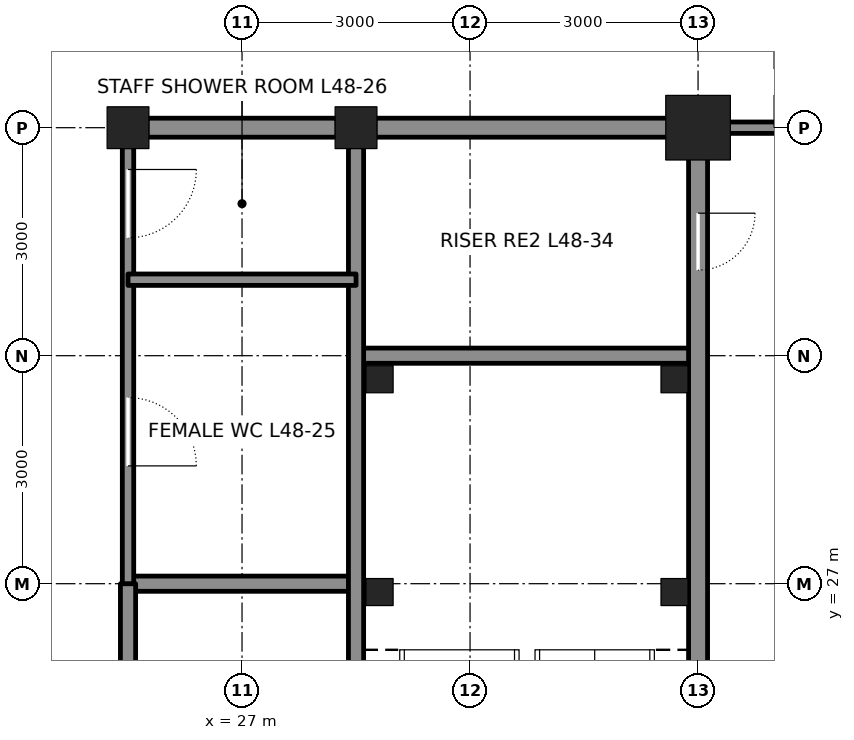
"""IFC4 building model, lengths in metres.
Left out: names, types, materials, properties, quantities, classifications, styles, units other than length and angle.
Written with IfcOpenShell. Run it as: python <this file> out.ifc"""

import sys

from ifc_helpers import new_model, si_unit, direction, frame, frame_2d, origin, origin_2d, place, context, subcontext, project, spatial, rectangle, hollow_rectangle, extrude, element, fill, save


model = new_model("IFC4")
c1 = context("Model", 3, precision=1e-05, world=origin(), true_north=direction((0.0, 1.0)))
c2 = subcontext(c1, "Body", "Model", "MODEL_VIEW")
j1 = project(units=[si_unit("LENGTHUNIT", "METRE"), si_unit("PLANEANGLEUNIT", "RADIAN")], contexts=[c1])
p1 = place(None, origin())
s1 = spatial("IfcSite", under=j1, at=p1, CompositionType="ELEMENT")
p2 = place(p1, origin())
s2 = spatial("IfcBuilding", under=s1, at=p2, CompositionType="ELEMENT")
p3 = place(p2, frame((0.0, 0.0, 218.1)))
s3 = spatial("IfcBuildingStorey", under=s2, at=p3, CompositionType="ELEMENT", Elevation=218.1)
for number, where, z_axis, x_axis in (
    (1, (25.5, 33.0, 0.0), (0.0, 0.0, 1.0), (1.0, 0.0, 0.0)),
    (2, (28.5, 33.0, 0.0), (0.0, 0.0, 1.0), (1.0, 0.0, 0.0)),
):
    element("IfcColumn", number, at=place(p3, frame(where, z_axis=z_axis, x_axis=x_axis)), inside=s3, PredefinedType="COLUMN", context=c2, shape_type="SweptSolid", body=[
        extrude(hollow_rectangle(XDim=0.55, YDim=0.55, WallThickness=0.045, at=origin_2d()), origin(), (0.0, 0.0, 1.0), 4.2),
    ])
p4 = place(p3, frame((33.0, 33.0, 0.0), z_axis=(0.0, 0.0, 1.0), x_axis=(1.0, 0.0, 0.0)))
e3 = element("IfcColumn", 3, at=p4, inside=s3, PredefinedType="COLUMN", context=c2, shape_type="SweptSolid", body=[
    extrude(hollow_rectangle(XDim=0.85, YDim=0.85, WallThickness=0.085, at=origin_2d()), origin(), (0.0, 0.0, 1.0), 4.2),
])
p5 = place(p3, frame((25.5, 27.0, 0.0), z_axis=(0.0, 0.0, 1.0), x_axis=(1.0, 0.0, 0.0)))
e4 = element("IfcWall", 4, at=p5, inside=s3, PredefinedType="SOLIDWALL", context=c2, shape_type="SweptSolid", body=[
    extrude(rectangle(XDim=3.0, YDim=0.2, at=frame_2d((1.5, 0.0))), origin(), (0.0, 0.0, 1.0), 4.04),
])
p6 = place(p3, frame((28.5, 30.0, 0.0), z_axis=(0.0, 0.0, 1.0), x_axis=(1.0, 0.0, 0.0)))
e5 = element("IfcWall", 5, at=p6, inside=s3, PredefinedType="SOLIDWALL", context=c2, shape_type="SweptSolid", body=[
    extrude(rectangle(XDim=4.5, YDim=0.2, at=frame_2d((2.25, 0.0))), origin(), (0.0, 0.0, 1.0), 4.04),
])
p7 = place(p3, frame((25.75, 33.0, 0.0), z_axis=(0.0, 0.0, 1.0), x_axis=(1.0, 0.0, 0.0)))
e6 = element("IfcWall", 6, at=p7, inside=s3, PredefinedType="SOLIDWALL", context=c2, shape_type="SweptSolid", body=[
    extrude(rectangle(XDim=2.5, YDim=0.25, at=frame_2d((1.25, 0.0))), origin(), (0.0, 0.0, 1.0), 3.181),
])
p8 = place(p3, frame((28.75, 33.0, 0.0), z_axis=(0.0, 0.0, 1.0), x_axis=(1.0, 0.0, 0.0)))
e7 = element("IfcWall", 7, at=p8, inside=s3, PredefinedType="SOLIDWALL", context=c2, shape_type="SweptSolid", body=[
    extrude(rectangle(XDim=4.0, YDim=0.25, at=frame_2d((2.0, 0.0))), origin(), (0.0, 0.0, 1.0), 3.181),
])
p9 = place(p3, frame((25.5, 15.0, 0.0), z_axis=(0.0, 0.0, 1.0), x_axis=(0.0, 1.0, 0.0)))
e8 = element("IfcWall", 8, at=p9, inside=s3, PredefinedType="SOLIDWALL", context=c2, shape_type="SweptSolid", body=[
    extrude(rectangle(XDim=12.0, YDim=0.2, at=frame_2d((6.0, 0.0))), origin(), (0.0, 0.0, 1.0), 3.064),
])
p10 = place(p3, frame((25.5, 27.0, 0.0), z_axis=(0.0, 0.0, 1.0), x_axis=(0.0, 1.0, 0.0)))
e9 = element("IfcWall", 9, at=p10, inside=s3, PredefinedType="PARTITIONING", context=c2, shape_type="SweptSolid", body=[
    extrude(rectangle(XDim=5.75, YDim=0.15, at=frame_2d((2.875, 0.0))), origin(), (0.0, 0.0, 1.0), 3.064),
])
p11 = place(p10, frame((1.55, 0.0, 0.0)))
e10 = element("IfcOpeningElement", 10, at=p11, cuts=e9, PredefinedType="OPENING", context=c2, shape_type="SweptSolid", body=[
    extrude(rectangle(XDim=0.9, YDim=2.1, at=frame_2d((0.45, 1.05))), frame((0.0, 0.085, 0.0), z_axis=(0.0, -1.0, 0.0), x_axis=(1.0, 0.0, 0.0)), (0.0, 0.0, 1.0), 0.17),
])
p12 = place(p10, frame((4.55, 0.0, 0.0)))
e11 = element("IfcOpeningElement", 11, at=p12, cuts=e9, PredefinedType="OPENING", context=c2, shape_type="SweptSolid", body=[
    extrude(rectangle(XDim=0.9, YDim=2.1, at=frame_2d((0.45, 1.05))), frame((0.0, 0.085, 0.0), z_axis=(0.0, -1.0, 0.0), x_axis=(1.0, 0.0, 0.0)), (0.0, 0.0, 1.0), 0.17),
])
p13 = place(p3, frame((28.5, 24.25, 0.0), z_axis=(0.0, 0.0, 1.0), x_axis=(0.0, 1.0, 0.0)))
e12 = element("IfcWall", 12, at=p13, inside=s3, PredefinedType="SOLIDWALL", context=c2, shape_type="SweptSolid", body=[
    extrude(rectangle(XDim=8.5, YDim=0.2, at=frame_2d((4.25, 0.0))), origin(), (0.0, 0.0, 1.0), 3.113),
])
p14 = place(p3, frame((33.0, 24.25, 0.0), z_axis=(0.0, 0.0, 1.0), x_axis=(0.0, 1.0, 0.0)))
e13 = element("IfcWall", 13, at=p14, inside=s3, PredefinedType="SOLIDWALL", context=c2, shape_type="SweptSolid", body=[
    extrude(rectangle(XDim=8.5, YDim=0.25, at=frame_2d((4.25, 0.0))), origin(), (0.0, 0.0, 1.0), 3.113),
])
p15 = place(p14, frame((6.875, 0.0, 0.0)))
e14 = element("IfcOpeningElement", 14, at=p15, cuts=e13, PredefinedType="OPENING", context=c2, shape_type="SweptSolid", body=[
    extrude(rectangle(XDim=0.75, YDim=2.1, at=frame_2d((0.375, 1.05))), frame((0.0, 0.135, 0.0), z_axis=(0.0, -1.0, 0.0), x_axis=(1.0, 0.0, 0.0)), (0.0, 0.0, 1.0), 0.27),
])
p16 = place(p3, frame((25.5, 31.0, 0.0), z_axis=(0.0, 0.0, 1.0), x_axis=(1.0, 0.0, 0.0)))
e15 = element("IfcWall", 15, at=p16, inside=s3, PredefinedType="PARTITIONING", context=c2, shape_type="SweptSolid", body=[
    extrude(rectangle(XDim=3.0, YDim=0.15, at=frame_2d((1.5, 0.0))), origin(), (0.0, 0.0, 1.0), 4.04),
])
p17 = place(p3, frame((33.0, 33.0, 0.0), z_axis=(0.0, 0.0, 1.0), x_axis=(1.0, 0.0, 0.0)))
e16 = element("IfcWall", 16, at=p17, inside=s3, PredefinedType="PARTITIONING", context=c2, shape_type="SweptSolid", body=[
    extrude(rectangle(XDim=3.0, YDim=0.15, at=frame_2d((1.5, 0.0))), origin(), (0.0, 0.0, 1.0), 3.27),
])
p18 = place(p17, frame((1.0, 0.0, 0.0)))
e17 = element("IfcOpeningElement", 17, at=p18, cuts=e16, PredefinedType="OPENING", context=c2, shape_type="SweptSolid", body=[
    extrude(rectangle(XDim=1.0, YDim=2.4, at=frame_2d((0.5, 1.2))), frame((0.0, 0.085, 0.0), z_axis=(0.0, -1.0, 0.0), x_axis=(1.0, 0.0, 0.0)), (0.0, 0.0, 1.0), 0.17),
])
for number, where, z_axis, x_axis in (
    (18, (28.81, 29.69, 0.0), (0.0, 0.0, 1.0), (1.0, 0.0, 0.0)),
    (19, (32.69, 29.69, 0.0), (0.0, 0.0, 1.0), (1.0, 0.0, 0.0)),
    (20, (28.81, 26.89, 0.0), (0.0, 0.0, 1.0), (1.0, 0.0, 0.0)),
    (21, (32.69, 26.89, 0.0), (0.0, 0.0, 1.0), (1.0, 0.0, 0.0)),
):
    element("IfcColumn", number, at=place(p3, frame(where, z_axis=z_axis, x_axis=x_axis)), inside=s3, PredefinedType="COLUMN", context=c2, shape_type="SweptSolid", body=[
        extrude(hollow_rectangle(XDim=0.356, YDim=0.356, WallThickness=0.009, at=origin_2d()), origin(), (0.0, 0.0, 1.0), 4.2),
    ])
p19 = place(p15, frame((0.75, 0.0, 0.0), z_axis=(0.0, 0.0, 1.0), x_axis=(-1.0, 0.0, 0.0)))
e22 = element("IfcDoor", 22, at=p19, inside=s3, OperationType="SINGLE_SWING_LEFT", PredefinedType="DOOR", context=c2, shape_type="SweptSolid", body=[
    extrude(rectangle(XDim=0.75, YDim=2.1, at=frame_2d((0.375, 1.05))), frame((0.0, 0.025, 0.0), z_axis=(0.0, -1.0, 0.0), x_axis=(1.0, 0.0, 0.0)), (0.0, 0.0, 1.0), 0.05),
])
fill(e14, e22)
p20 = place(p11, frame((0.9, 0.0, 0.0), z_axis=(0.0, 0.0, 1.0), x_axis=(-1.0, 0.0, 0.0)))
e23 = element("IfcDoor", 23, at=p20, inside=s3, OperationType="SINGLE_SWING_RIGHT", PredefinedType="DOOR", context=c2, shape_type="SweptSolid", body=[
    extrude(rectangle(XDim=0.9, YDim=2.1, at=frame_2d((0.45, 1.05))), frame((0.0, 0.025, 0.0), z_axis=(0.0, -1.0, 0.0), x_axis=(1.0, 0.0, 0.0)), (0.0, 0.0, 1.0), 0.05),
])
fill(e10, e23)
p21 = place(p12, frame((0.9, 0.0, 0.0), z_axis=(0.0, 0.0, 1.0), x_axis=(-1.0, 0.0, 0.0)))
e24 = element("IfcDoor", 24, at=p21, inside=s3, OperationType="SINGLE_SWING_LEFT", PredefinedType="DOOR", context=c2, shape_type="SweptSolid", body=[
    extrude(rectangle(XDim=0.9, YDim=2.1, at=frame_2d((0.45, 1.05))), frame((0.0, 0.025, 0.0), z_axis=(0.0, -1.0, 0.0), x_axis=(1.0, 0.0, 0.0)), (0.0, 0.0, 1.0), 0.05),
])
fill(e11, e24)
save(model, sys.argv[1])
